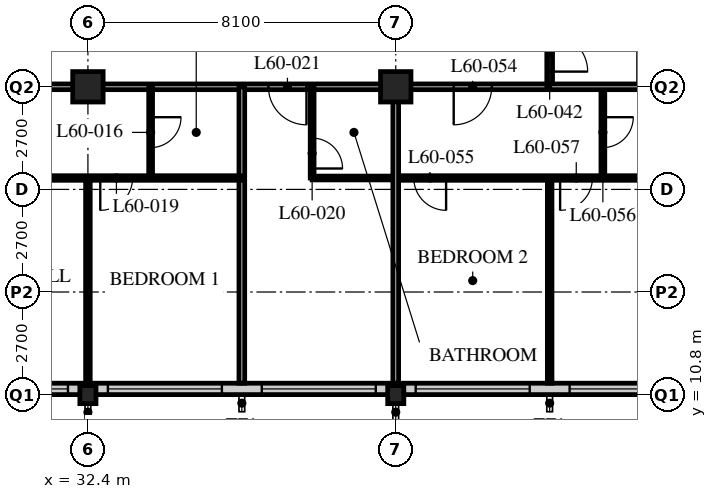
"""IFC4 building model, lengths in metres.
Left out: names, types, materials, properties, quantities, classifications, styles, units other than length and angle.
Written with IfcOpenShell. Run it as: python <this file> out.ifc"""

import sys

from ifc_helpers import new_model, si_unit, direction, frame, frame_2d, origin, origin_2d, place, context, subcontext, project, spatial, rectangle, hollow_rectangle, i_section, extrude, element, fill, save


model = new_model("IFC4")
c1 = context("Model", 3, precision=1e-05, world=origin(), true_north=direction((0.0, 1.0)))
c2 = subcontext(c1, "Body", "Model", "MODEL_VIEW")
j1 = project(units=[si_unit("LENGTHUNIT", "METRE"), si_unit("PLANEANGLEUNIT", "RADIAN")], contexts=[c1])
p1 = place(None, origin())
s1 = spatial("IfcSite", under=j1, at=p1, CompositionType="ELEMENT")
p2 = place(p1, origin())
s2 = spatial("IfcBuilding", under=s1, at=p2, CompositionType="ELEMENT")
p3 = place(p2, frame((0.0, 0.0, 231.6)))
s3 = spatial("IfcBuildingStorey", under=s2, at=p3, CompositionType="ELEMENT", Elevation=231.6)
p4 = place(p3, frame((32.4, 10.8, 0.0), z_axis=(0.0, 0.0, 1.0), x_axis=(1.0, 0.0, 0.0)))
e1 = element("IfcColumn", 1, at=p4, inside=s3, PredefinedType="COLUMN", context=c2, shape_type="SweptSolid", body=[
    extrude(i_section(OverallWidth=0.424, OverallDepth=0.475, WebThickness=0.048, FlangeThickness=0.077, FilletRadius=0.015, at=origin_2d()), origin(), (0.0, 0.0, 1.0), 3.6),
])
p5 = place(p3, frame((32.4, 18.9, 0.0), z_axis=(0.0, 0.0, 1.0), x_axis=(1.0, 0.0, 0.0)))
e2 = element("IfcColumn", 2, at=p5, inside=s3, PredefinedType="COLUMN", context=c2, shape_type="SweptSolid", body=[
    extrude(hollow_rectangle(XDim=0.8, YDim=0.8, WallThickness=0.08, at=origin_2d()), origin(), (0.0, 0.0, 1.0), 3.6),
])
p6 = place(p3, frame((40.5, 10.8, 0.0), z_axis=(0.0, 0.0, 1.0), x_axis=(1.0, 0.0, 0.0)))
e3 = element("IfcColumn", 3, at=p6, inside=s3, PredefinedType="COLUMN", context=c2, shape_type="SweptSolid", body=[
    extrude(i_section(OverallWidth=0.424, OverallDepth=0.475, WebThickness=0.048, FlangeThickness=0.077, FilletRadius=0.015, at=origin_2d()), origin(), (0.0, 0.0, 1.0), 3.6),
])
p7 = place(p3, frame((40.5, 18.9, 0.0), z_axis=(0.0, 0.0, 1.0), x_axis=(1.0, 0.0, 0.0)))
e4 = element("IfcColumn", 4, at=p7, inside=s3, PredefinedType="COLUMN", context=c2, shape_type="SweptSolid", body=[
    extrude(hollow_rectangle(XDim=0.8, YDim=0.8, WallThickness=0.08, at=origin_2d()), origin(), (0.0, 0.0, 1.0), 3.6),
])
p8 = place(p3, frame((8.4, 10.95, 0.0), z_axis=(0.0, 0.0, 1.0), x_axis=(1.0, 0.0, 0.0)))
e5 = element("IfcWall", 5, at=p8, inside=s3, PredefinedType="SOLIDWALL", context=c2, shape_type="SweptSolid", body=[
    extrude(rectangle(XDim=40.2, YDim=0.3, at=frame_2d((20.1, 0.0))), origin(), (0.0, 0.0, 1.0), 2.35),
])
p9 = place(p8, frame((0.225, 0.0, 0.6)))
e6 = element("IfcOpeningElement", 6, at=p9, cuts=e5, PredefinedType="OPENING", context=c2, shape_type="SweptSolid", body=[
    extrude(rectangle(XDim=3.0, YDim=1.7, at=frame_2d((1.5, 0.85))), frame((0.0, 0.16, 0.0), z_axis=(0.0, -1.0, 0.0), x_axis=(1.0, 0.0, 0.0)), (0.0, 0.0, 1.0), 0.32),
])
p10 = place(p8, frame((4.275, 0.0, 0.6)))
e7 = element("IfcOpeningElement", 7, at=p10, cuts=e5, PredefinedType="OPENING", context=c2, shape_type="SweptSolid", body=[
    extrude(rectangle(XDim=3.0, YDim=1.7, at=frame_2d((1.5, 0.85))), frame((0.0, 0.16, 0.0), z_axis=(0.0, -1.0, 0.0), x_axis=(1.0, 0.0, 0.0)), (0.0, 0.0, 1.0), 0.32),
])
p11 = place(p8, frame((8.325, 0.0, 0.6)))
e8 = element("IfcOpeningElement", 8, at=p11, cuts=e5, PredefinedType="OPENING", context=c2, shape_type="SweptSolid", body=[
    extrude(rectangle(XDim=3.0, YDim=1.7, at=frame_2d((1.5, 0.85))), frame((0.0, 0.16, 0.0), z_axis=(0.0, -1.0, 0.0), x_axis=(1.0, 0.0, 0.0)), (0.0, 0.0, 1.0), 0.32),
])
p12 = place(p8, frame((12.375, 0.0, 0.6)))
e9 = element("IfcOpeningElement", 9, at=p12, cuts=e5, PredefinedType="OPENING", context=c2, shape_type="SweptSolid", body=[
    extrude(rectangle(XDim=3.0, YDim=1.7, at=frame_2d((1.5, 0.85))), frame((0.0, 0.16, 0.0), z_axis=(0.0, -1.0, 0.0), x_axis=(1.0, 0.0, 0.0)), (0.0, 0.0, 1.0), 0.32),
])
p13 = place(p8, frame((16.425, 0.0, 0.6)))
e10 = element("IfcOpeningElement", 10, at=p13, cuts=e5, PredefinedType="OPENING", context=c2, shape_type="SweptSolid", body=[
    extrude(rectangle(XDim=3.0, YDim=1.7, at=frame_2d((1.5, 0.85))), frame((0.0, 0.16, 0.0), z_axis=(0.0, -1.0, 0.0), x_axis=(1.0, 0.0, 0.0)), (0.0, 0.0, 1.0), 0.32),
])
p14 = place(p8, frame((20.475, 0.0, 0.6)))
e11 = element("IfcOpeningElement", 11, at=p14, cuts=e5, PredefinedType="OPENING", context=c2, shape_type="SweptSolid", body=[
    extrude(rectangle(XDim=3.0, YDim=1.7, at=frame_2d((1.5, 0.85))), frame((0.0, 0.16, 0.0), z_axis=(0.0, -1.0, 0.0), x_axis=(1.0, 0.0, 0.0)), (0.0, 0.0, 1.0), 0.32),
])
p15 = place(p8, frame((24.525, 0.0, 0.6)))
e12 = element("IfcOpeningElement", 12, at=p15, cuts=e5, PredefinedType="OPENING", context=c2, shape_type="SweptSolid", body=[
    extrude(rectangle(XDim=3.0, YDim=1.7, at=frame_2d((1.5, 0.85))), frame((0.0, 0.16, 0.0), z_axis=(0.0, -1.0, 0.0), x_axis=(1.0, 0.0, 0.0)), (0.0, 0.0, 1.0), 0.32),
])
p16 = place(p8, frame((28.575, 0.0, 0.6)))
e13 = element("IfcOpeningElement", 13, at=p16, cuts=e5, PredefinedType="OPENING", context=c2, shape_type="SweptSolid", body=[
    extrude(rectangle(XDim=3.0, YDim=1.7, at=frame_2d((1.5, 0.85))), frame((0.0, 0.16, 0.0), z_axis=(0.0, -1.0, 0.0), x_axis=(1.0, 0.0, 0.0)), (0.0, 0.0, 1.0), 0.32),
])
p17 = place(p8, frame((32.625, 0.0, 0.6)))
e14 = element("IfcOpeningElement", 14, at=p17, cuts=e5, PredefinedType="OPENING", context=c2, shape_type="SweptSolid", body=[
    extrude(rectangle(XDim=3.0, YDim=1.7, at=frame_2d((1.5, 0.85))), frame((0.0, 0.16, 0.0), z_axis=(0.0, -1.0, 0.0), x_axis=(1.0, 0.0, 0.0)), (0.0, 0.0, 1.0), 0.32),
])
p18 = place(p8, frame((36.675, 0.0, 0.6)))
e15 = element("IfcOpeningElement", 15, at=p18, cuts=e5, PredefinedType="OPENING", context=c2, shape_type="SweptSolid", body=[
    extrude(rectangle(XDim=3.0, YDim=1.7, at=frame_2d((1.5, 0.85))), frame((0.0, 0.16, 0.0), z_axis=(0.0, -1.0, 0.0), x_axis=(1.0, 0.0, 0.0)), (0.0, 0.0, 1.0), 0.32),
])
p19 = place(p3, frame((8.1, 18.9, 0.0), z_axis=(0.0, 0.0, 1.0), x_axis=(1.0, 0.0, 0.0)))
e16 = element("IfcWall", 16, at=p19, inside=s3, PredefinedType="PARTITIONING", context=c2, shape_type="SweptSolid", body=[
    extrude(rectangle(XDim=36.45, YDim=0.15, at=frame_2d((18.225, 0.0))), origin(), (0.0, 0.0, 1.0), 2.35),
])
p20 = place(p19, frame((4.45, 0.0, 0.0)))
e17 = element("IfcOpeningElement", 17, at=p20, cuts=e16, PredefinedType="OPENING", context=c2, shape_type="SweptSolid", body=[
    extrude(rectangle(XDim=1.0, YDim=2.1, at=frame_2d((0.5, 1.05))), frame((0.0, 0.085, 0.0), z_axis=(0.0, -1.0, 0.0), x_axis=(1.0, 0.0, 0.0)), (0.0, 0.0, 1.0), 0.17),
])
p21 = place(p19, frame((17.1, 0.0, 0.0)))
e18 = element("IfcOpeningElement", 18, at=p21, cuts=e16, PredefinedType="OPENING", context=c2, shape_type="SweptSolid", body=[
    extrude(rectangle(XDim=1.0, YDim=2.1, at=frame_2d((0.5, 1.05))), frame((0.0, 0.085, 0.0), z_axis=(0.0, -1.0, 0.0), x_axis=(1.0, 0.0, 0.0)), (0.0, 0.0, 1.0), 0.17),
])
p22 = place(p19, frame((29.05, 0.0, 0.0)))
e19 = element("IfcOpeningElement", 19, at=p22, cuts=e16, PredefinedType="OPENING", context=c2, shape_type="SweptSolid", body=[
    extrude(rectangle(XDim=1.0, YDim=2.1, at=frame_2d((0.5, 1.05))), frame((0.0, 0.085, 0.0), z_axis=(0.0, -1.0, 0.0), x_axis=(1.0, 0.0, 0.0)), (0.0, 0.0, 1.0), 0.17),
])
p23 = place(p19, frame((2.625, 0.0, 0.0)))
e20 = element("IfcOpeningElement", 20, at=p23, cuts=e16, PredefinedType="OPENING", context=c2, shape_type="SweptSolid", body=[
    extrude(rectangle(XDim=1.0, YDim=2.1, at=frame_2d((0.5, 1.05))), frame((0.0, 0.085, 0.0), z_axis=(0.0, -1.0, 0.0), x_axis=(1.0, 0.0, 0.0)), (0.0, 0.0, 1.0), 0.17),
])
p24 = place(p19, frame((33.925, 0.0, 0.0)))
e21 = element("IfcOpeningElement", 21, at=p24, cuts=e16, PredefinedType="OPENING", context=c2, shape_type="SweptSolid", body=[
    extrude(rectangle(XDim=1.0, YDim=2.1, at=frame_2d((0.5, 1.05))), frame((0.0, 0.085, 0.0), z_axis=(0.0, -1.0, 0.0), x_axis=(1.0, 0.0, 0.0)), (0.0, 0.0, 1.0), 0.17),
])
p25 = place(p3, frame((44.55, 18.9, 0.0), z_axis=(0.0, 0.0, 1.0), x_axis=(0.0, 1.0, 0.0)))
e22 = element("IfcWall", 22, at=p25, inside=s3, PredefinedType="PARTITIONING", context=c2, shape_type="SweptSolid", body=[
    extrude(rectangle(XDim=24.3, YDim=0.15, at=frame_2d((12.15, 0.0))), origin(), (0.0, 0.0, 1.0), 3.35),
])
p26 = place(p25, frame((0.4, 0.0, 0.0)))
e23 = element("IfcOpeningElement", 23, at=p26, cuts=e22, PredefinedType="OPENING", context=c2, shape_type="SweptSolid", body=[
    extrude(rectangle(XDim=1.0, YDim=2.1, at=frame_2d((0.5, 1.05))), frame((0.0, 0.085, 0.0), z_axis=(0.0, -1.0, 0.0), x_axis=(1.0, 0.0, 0.0)), (0.0, 0.0, 1.0), 0.17),
])
p27 = place(p25, frame((16.6, 0.0, 0.0)))
e24 = element("IfcOpeningElement", 24, at=p27, cuts=e22, PredefinedType="OPENING", context=c2, shape_type="SweptSolid", body=[
    extrude(rectangle(XDim=1.0, YDim=2.1, at=frame_2d((0.5, 1.05))), frame((0.0, 0.085, 0.0), z_axis=(0.0, -1.0, 0.0), x_axis=(1.0, 0.0, 0.0)), (0.0, 0.0, 1.0), 0.17),
])
p28 = place(p3, frame((34.05, 18.9, 0.0), z_axis=(0.0, 0.0, 1.0), x_axis=(0.0, -1.0, 0.0)))
e25 = element("IfcWall", 25, at=p28, inside=s3, PredefinedType="PARTITIONING", context=c2, shape_type="SweptSolid", body=[
    extrude(rectangle(XDim=2.4, YDim=0.1, at=frame_2d((1.2, 0.0))), origin(), (0.0, 0.0, 1.0), 3.35),
])
p29 = place(p28, frame((0.8, 0.0, 0.0)))
e26 = element("IfcOpeningElement", 26, at=p29, cuts=e25, PredefinedType="OPENING", context=c2, shape_type="SweptSolid", body=[
    extrude(rectangle(XDim=0.8, YDim=2.1, at=frame_2d((0.4, 1.05))), frame((0.0, 0.06, 0.0), z_axis=(0.0, -1.0, 0.0), x_axis=(1.0, 0.0, 0.0)), (0.0, 0.0, 1.0), 0.12),
])
p30 = place(p3, frame((32.4, 16.5, 0.0), z_axis=(0.0, 0.0, 1.0), x_axis=(0.0, -1.0, 0.0)))
e27 = element("IfcWall", 27, at=p30, inside=s3, PredefinedType="PARTITIONING", context=c2, shape_type="SweptSolid", body=[
    extrude(rectangle(XDim=5.4, YDim=0.12, at=frame_2d((2.7, 0.0))), origin(), (0.0, 0.0, 1.0), 2.35),
])
p31 = place(p3, frame((36.45, 18.9, 0.0), z_axis=(0.0, 0.0, 1.0), x_axis=(0.0, -1.0, 0.0)))
e28 = element("IfcWall", 28, at=p31, inside=s3, PredefinedType="PARTITIONING", context=c2, shape_type="SweptSolid", body=[
    extrude(rectangle(XDim=7.8, YDim=0.15, at=frame_2d((3.9, 0.0))), origin(), (0.0, 0.0, 1.0), 3.35),
])
p32 = place(p3, frame((38.3, 16.5, 0.0), z_axis=(0.0, 0.0, 1.0), x_axis=(1.0, 0.0, 0.0)))
e29 = element("IfcWall", 29, at=p32, inside=s3, PredefinedType="PARTITIONING", context=c2, shape_type="SweptSolid", body=[
    extrude(rectangle(XDim=2.2, YDim=0.1, at=frame_2d((1.1, 0.0))), origin(), (0.0, 0.0, 1.0), 3.35),
])
p33 = place(p3, frame((38.3, 18.9, 0.0), z_axis=(0.0, 0.0, 1.0), x_axis=(0.0, -1.0, 0.0)))
e30 = element("IfcWall", 30, at=p33, inside=s3, PredefinedType="PARTITIONING", context=c2, shape_type="SweptSolid", body=[
    extrude(rectangle(XDim=2.4, YDim=0.1, at=frame_2d((1.2, 0.0))), origin(), (0.0, 0.0, 1.0), 3.35),
])
p34 = place(p33, frame((1.35, 0.0, 0.0)))
e31 = element("IfcOpeningElement", 31, at=p34, cuts=e30, PredefinedType="OPENING", context=c2, shape_type="SweptSolid", body=[
    extrude(rectangle(XDim=0.8, YDim=2.1, at=frame_2d((0.4, 1.05))), frame((0.0, 0.06, 0.0), z_axis=(0.0, -1.0, 0.0), x_axis=(1.0, 0.0, 0.0)), (0.0, 0.0, 1.0), 0.12),
])
p35 = place(p3, frame((8.1, 16.5, 0.0), z_axis=(0.0, 0.0, 1.0), x_axis=(1.0, 0.0, 0.0)))
e32 = element("IfcWall", 32, at=p35, inside=s3, PredefinedType="PARTITIONING", context=c2, shape_type="SweptSolid", body=[
    extrude(rectangle(XDim=28.35, YDim=0.12, at=frame_2d((14.175, 0.0))), origin(), (0.0, 0.0, 1.0), 3.35),
])
p36 = place(p35, frame((5.025, 0.0, 0.0)))
e33 = element("IfcOpeningElement", 33, at=p36, cuts=e32, PredefinedType="OPENING", context=c2, shape_type="SweptSolid", body=[
    extrude(rectangle(XDim=0.85, YDim=2.1, at=frame_2d((0.425, 1.05))), frame((0.0, 0.07, 0.0), z_axis=(0.0, -1.0, 0.0), x_axis=(1.0, 0.0, 0.0)), (0.0, 0.0, 1.0), 0.14),
])
p37 = place(p35, frame((12.475, 0.0, 0.0)))
e34 = element("IfcOpeningElement", 34, at=p37, cuts=e32, PredefinedType="OPENING", context=c2, shape_type="SweptSolid", body=[
    extrude(rectangle(XDim=0.85, YDim=2.1, at=frame_2d((0.425, 1.05))), frame((0.0, 0.07, 0.0), z_axis=(0.0, -1.0, 0.0), x_axis=(1.0, 0.0, 0.0)), (0.0, 0.0, 1.0), 0.14),
])
p38 = place(p35, frame((17.175, 0.0, 0.0)))
e35 = element("IfcOpeningElement", 35, at=p38, cuts=e32, PredefinedType="OPENING", context=c2, shape_type="SweptSolid", body=[
    extrude(rectangle(XDim=0.85, YDim=2.1, at=frame_2d((0.425, 1.05))), frame((0.0, 0.07, 0.0), z_axis=(0.0, -1.0, 0.0), x_axis=(1.0, 0.0, 0.0)), (0.0, 0.0, 1.0), 0.14),
])
p39 = place(p35, frame((24.625, 0.0, 0.0)))
e36 = element("IfcOpeningElement", 36, at=p39, cuts=e32, PredefinedType="OPENING", context=c2, shape_type="SweptSolid", body=[
    extrude(rectangle(XDim=0.85, YDim=2.1, at=frame_2d((0.425, 1.05))), frame((0.0, 0.07, 0.0), z_axis=(0.0, -1.0, 0.0), x_axis=(1.0, 0.0, 0.0)), (0.0, 0.0, 1.0), 0.14),
])
p40 = place(p35, frame((2.725, 0.0, 0.0)))
e37 = element("IfcOpeningElement", 37, at=p40, cuts=e32, PredefinedType="OPENING", context=c2, shape_type="SweptSolid", body=[
    extrude(rectangle(XDim=0.85, YDim=2.1, at=frame_2d((0.425, 1.05))), frame((0.0, 0.07, 0.0), z_axis=(0.0, -1.0, 0.0), x_axis=(1.0, 0.0, 0.0)), (0.0, 0.0, 1.0), 0.14),
])
p41 = place(p3, frame((40.5, 16.5, 0.0), z_axis=(0.0, 0.0, 1.0), x_axis=(1.0, 0.0, 0.0)))
e38 = element("IfcWall", 38, at=p41, inside=s3, PredefinedType="PARTITIONING", context=c2, shape_type="SweptSolid", body=[
    extrude(rectangle(XDim=8.05, YDim=0.12, at=frame_2d((4.025, 0.0))), origin(), (0.0, 0.0, 1.0), 3.35),
])
p42 = place(p41, frame((0.475, 0.0, 0.0)))
e39 = element("IfcOpeningElement", 39, at=p42, cuts=e38, PredefinedType="OPENING", context=c2, shape_type="SweptSolid", body=[
    extrude(rectangle(XDim=0.85, YDim=2.1, at=frame_2d((0.425, 1.05))), frame((0.0, 0.07, 0.0), z_axis=(0.0, -1.0, 0.0), x_axis=(1.0, 0.0, 0.0)), (0.0, 0.0, 1.0), 0.14),
])
p43 = place(p41, frame((4.325, 0.0, 0.0)))
e40 = element("IfcOpeningElement", 40, at=p43, cuts=e38, PredefinedType="OPENING", context=c2, shape_type="SweptSolid", body=[
    extrude(rectangle(XDim=0.85, YDim=2.1, at=frame_2d((0.425, 1.05))), frame((0.0, 0.07, 0.0), z_axis=(0.0, -1.0, 0.0), x_axis=(1.0, 0.0, 0.0)), (0.0, 0.0, 1.0), 0.14),
])
p44 = place(p3, frame((45.95, 18.9, 0.0), z_axis=(0.0, 0.0, 1.0), x_axis=(0.0, -1.0, 0.0)))
e41 = element("IfcWall", 41, at=p44, inside=s3, PredefinedType="PARTITIONING", context=c2, shape_type="SweptSolid", body=[
    extrude(rectangle(XDim=2.4, YDim=0.1, at=frame_2d((1.2, 0.0))), origin(), (0.0, 0.0, 1.0), 3.35),
])
p45 = place(p44, frame((0.8, 0.0, 0.0)))
e42 = element("IfcOpeningElement", 42, at=p45, cuts=e41, PredefinedType="OPENING", context=c2, shape_type="SweptSolid", body=[
    extrude(rectangle(XDim=0.8, YDim=2.1, at=frame_2d((0.4, 1.05))), frame((0.0, 0.06, 0.0), z_axis=(0.0, -1.0, 0.0), x_axis=(1.0, 0.0, 0.0)), (0.0, 0.0, 1.0), 0.12),
])
p46 = place(p3, frame((44.55, 16.5, 0.0), z_axis=(0.0, 0.0, 1.0), x_axis=(0.0, -1.0, 0.0)))
e43 = element("IfcWall", 43, at=p46, inside=s3, PredefinedType="PARTITIONING", context=c2, shape_type="SweptSolid", body=[
    extrude(rectangle(XDim=5.4, YDim=0.12, at=frame_2d((2.7, 0.0))), origin(), (0.0, 0.0, 1.0), 3.35),
])
p47 = place(p3, frame((44.55, 18.9, 0.0), z_axis=(0.0, 0.0, 1.0), x_axis=(1.0, 0.0, 0.0)))
e44 = element("IfcWall", 44, at=p47, inside=s3, PredefinedType="PARTITIONING", context=c2, shape_type="SweptSolid", body=[
    extrude(rectangle(XDim=7.8, YDim=0.15, at=frame_2d((3.9, 0.0))), origin(), (0.0, 0.0, 1.0), 2.35),
])
p48 = place(p3, frame((40.5, 18.9, 0.0), z_axis=(0.0, 0.0, 1.0), x_axis=(0.0, -1.0, 0.0)))
e45 = element("IfcWall", 45, at=p48, inside=s3, PredefinedType="PARTITIONING", context=c2, shape_type="SweptSolid", body=[
    extrude(rectangle(XDim=7.8, YDim=0.15, at=frame_2d((3.9, 0.0))), origin(), (0.0, 0.0, 1.0), 2.35),
])
p49 = place(p14, origin())
e46 = element("IfcWindow", 46, at=p49, inside=s3, PartitioningType="SINGLE_PANEL", PredefinedType="WINDOW", context=c2, shape_type="SweptSolid", body=[
    extrude(rectangle(XDim=3.0, YDim=1.7, at=frame_2d((1.5, 0.85))), frame((0.0, 0.03, 0.0), z_axis=(0.0, -1.0, 0.0), x_axis=(1.0, 0.0, 0.0)), (0.0, 0.0, 1.0), 0.06),
])
fill(e11, e46)
p50 = place(p15, origin())
e47 = element("IfcWindow", 47, at=p50, inside=s3, PartitioningType="SINGLE_PANEL", PredefinedType="WINDOW", context=c2, shape_type="SweptSolid", body=[
    extrude(rectangle(XDim=3.0, YDim=1.7, at=frame_2d((1.5, 0.85))), frame((0.0, 0.03, 0.0), z_axis=(0.0, -1.0, 0.0), x_axis=(1.0, 0.0, 0.0)), (0.0, 0.0, 1.0), 0.06),
])
fill(e12, e47)
p51 = place(p16, origin())
e48 = element("IfcWindow", 48, at=p51, inside=s3, PartitioningType="SINGLE_PANEL", PredefinedType="WINDOW", context=c2, shape_type="SweptSolid", body=[
    extrude(rectangle(XDim=3.0, YDim=1.7, at=frame_2d((1.5, 0.85))), frame((0.0, 0.03, 0.0), z_axis=(0.0, -1.0, 0.0), x_axis=(1.0, 0.0, 0.0)), (0.0, 0.0, 1.0), 0.06),
])
fill(e13, e48)
p52 = place(p17, origin())
e49 = element("IfcWindow", 49, at=p52, inside=s3, PartitioningType="SINGLE_PANEL", PredefinedType="WINDOW", context=c2, shape_type="SweptSolid", body=[
    extrude(rectangle(XDim=3.0, YDim=1.7, at=frame_2d((1.5, 0.85))), frame((0.0, 0.03, 0.0), z_axis=(0.0, -1.0, 0.0), x_axis=(1.0, 0.0, 0.0)), (0.0, 0.0, 1.0), 0.06),
])
fill(e14, e49)
p53 = place(p18, origin())
e50 = element("IfcWindow", 50, at=p53, inside=s3, PartitioningType="SINGLE_PANEL", PredefinedType="WINDOW", context=c2, shape_type="SweptSolid", body=[
    extrude(rectangle(XDim=3.0, YDim=1.7, at=frame_2d((1.5, 0.85))), frame((0.0, 0.03, 0.0), z_axis=(0.0, -1.0, 0.0), x_axis=(1.0, 0.0, 0.0)), (0.0, 0.0, 1.0), 0.06),
])
fill(e15, e50)
p54 = place(p29, origin())
e51 = element("IfcDoor", 51, at=p54, inside=s3, OperationType="SINGLE_SWING_LEFT", PredefinedType="DOOR", context=c2, shape_type="SweptSolid", body=[
    extrude(rectangle(XDim=0.8, YDim=2.1, at=frame_2d((0.4, 1.05))), frame((0.0, 0.025, 0.0), z_axis=(0.0, -1.0, 0.0), x_axis=(1.0, 0.0, 0.0)), (0.0, 0.0, 1.0), 0.05),
])
fill(e26, e51)
p55 = place(p39, origin())
e52 = element("IfcDoor", 52, at=p55, inside=s3, OperationType="SINGLE_SWING_RIGHT", PredefinedType="DOOR", context=c2, shape_type="SweptSolid", body=[
    extrude(rectangle(XDim=0.85, YDim=2.1, at=frame_2d((0.425, 1.05))), frame((0.0, 0.025, 0.0), z_axis=(0.0, -1.0, 0.0), x_axis=(1.0, 0.0, 0.0)), (0.0, 0.0, 1.0), 0.05),
])
fill(e36, e52)
p56 = place(p34, origin())
e53 = element("IfcDoor", 53, at=p56, inside=s3, OperationType="SINGLE_SWING_RIGHT", PredefinedType="DOOR", context=c2, shape_type="SweptSolid", body=[
    extrude(rectangle(XDim=0.8, YDim=2.1, at=frame_2d((0.4, 1.05))), frame((0.0, 0.025, 0.0), z_axis=(0.0, -1.0, 0.0), x_axis=(1.0, 0.0, 0.0)), (0.0, 0.0, 1.0), 0.05),
])
fill(e31, e53)
p57 = place(p22, origin())
e54 = element("IfcDoor", 54, at=p57, inside=s3, OperationType="SINGLE_SWING_LEFT", PredefinedType="DOOR", context=c2, shape_type="SweptSolid", body=[
    extrude(rectangle(XDim=1.0, YDim=2.1, at=frame_2d((0.5, 1.05))), frame((0.0, 0.025, 0.0), z_axis=(0.0, -1.0, 0.0), x_axis=(1.0, 0.0, 0.0)), (0.0, 0.0, 1.0), 0.05),
])
fill(e19, e54)
p58 = place(p26, origin())
e55 = element("IfcDoor", 55, at=p58, inside=s3, OperationType="SINGLE_SWING_RIGHT", PredefinedType="DOOR", context=c2, shape_type="SweptSolid", body=[
    extrude(rectangle(XDim=1.0, YDim=2.1, at=frame_2d((0.5, 1.05))), frame((0.0, 0.025, 0.0), z_axis=(0.0, -1.0, 0.0), x_axis=(1.0, 0.0, 0.0)), (0.0, 0.0, 1.0), 0.05),
])
fill(e23, e55)
p59 = place(p24, origin())
e56 = element("IfcDoor", 56, at=p59, inside=s3, OperationType="SINGLE_SWING_RIGHT", PredefinedType="DOOR", context=c2, shape_type="SweptSolid", body=[
    extrude(rectangle(XDim=1.0, YDim=2.1, at=frame_2d((0.5, 1.05))), frame((0.0, 0.025, 0.0), z_axis=(0.0, -1.0, 0.0), x_axis=(1.0, 0.0, 0.0)), (0.0, 0.0, 1.0), 0.05),
])
fill(e21, e56)
p60 = place(p42, origin())
e57 = element("IfcDoor", 57, at=p60, inside=s3, OperationType="SINGLE_SWING_LEFT", PredefinedType="DOOR", context=c2, shape_type="SweptSolid", body=[
    extrude(rectangle(XDim=0.85, YDim=2.1, at=frame_2d((0.425, 1.05))), frame((0.0, 0.025, 0.0), z_axis=(0.0, -1.0, 0.0), x_axis=(1.0, 0.0, 0.0)), (0.0, 0.0, 1.0), 0.05),
])
fill(e39, e57)
p61 = place(p45, origin())
e58 = element("IfcDoor", 58, at=p61, inside=s3, OperationType="SINGLE_SWING_LEFT", PredefinedType="DOOR", context=c2, shape_type="SweptSolid", body=[
    extrude(rectangle(XDim=0.8, YDim=2.1, at=frame_2d((0.4, 1.05))), frame((0.0, 0.025, 0.0), z_axis=(0.0, -1.0, 0.0), x_axis=(1.0, 0.0, 0.0)), (0.0, 0.0, 1.0), 0.05),
])
fill(e42, e58)
p62 = place(p43, origin())
e59 = element("IfcDoor", 59, at=p62, inside=s3, OperationType="SINGLE_SWING_RIGHT", PredefinedType="DOOR", context=c2, shape_type="SweptSolid", body=[
    extrude(rectangle(XDim=0.85, YDim=2.1, at=frame_2d((0.425, 1.05))), frame((0.0, 0.025, 0.0), z_axis=(0.0, -1.0, 0.0), x_axis=(1.0, 0.0, 0.0)), (0.0, 0.0, 1.0), 0.05),
])
fill(e40, e59)
save(model, sys.argv[1])
